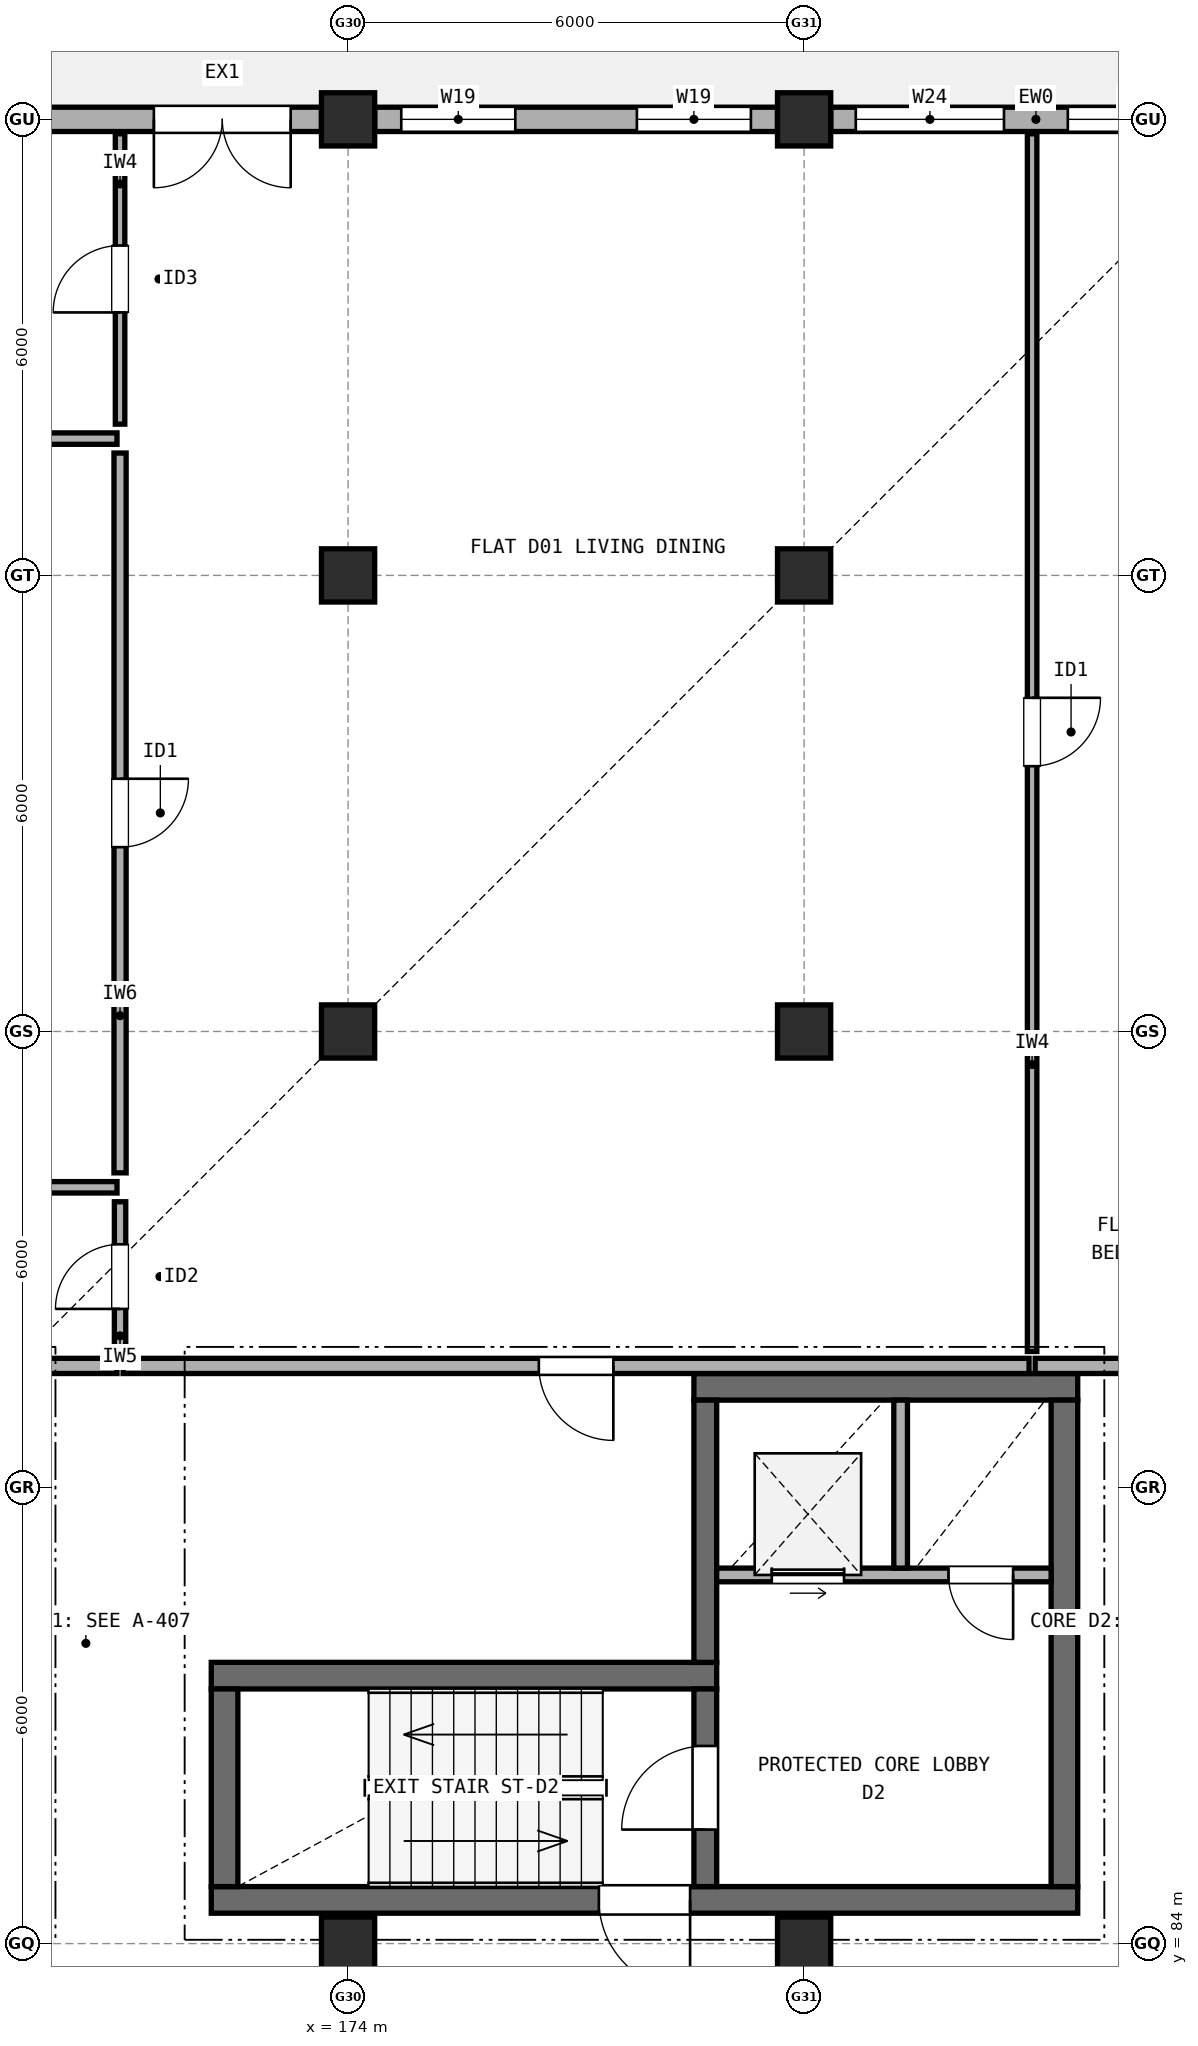
"""IFC4 building model, lengths in metres.
Left out: names, types, materials, properties, quantities, classifications, styles, units other than length and angle.
Written with IfcOpenShell. Run it as: python <this file> out.ifc"""

import sys

from ifc_helpers import new_model, si_unit, direction, frame, frame_2d, origin, origin_2d, place, context, subcontext, project, spatial, rectangle, extrude, element, fill, save


model = new_model("IFC4")
c1 = context("Model", 3, precision=1e-05, world=origin(), true_north=direction((0.0, 1.0)))
c2 = subcontext(c1, "Body", "Model", "MODEL_VIEW")
j1 = project(units=[si_unit("LENGTHUNIT", "METRE"), si_unit("PLANEANGLEUNIT", "RADIAN")], contexts=[c1])
p1 = place(None, origin())
s1 = spatial("IfcSite", under=j1, at=p1, CompositionType="ELEMENT")
p2 = place(p1, origin())
s2 = spatial("IfcBuilding", under=s1, at=p2, CompositionType="ELEMENT")
p3 = place(p2, origin())
s3 = spatial("IfcBuildingStorey", under=s2, at=p3, CompositionType="ELEMENT", Elevation=0.0)
for number, where, z_axis, x_axis in (
    (1, (174.0, 84.0, 0.0), (0.0, 0.0, 1.0), (1.0, 0.0, 0.0)),
    (2, (174.0, 96.0, 0.0), (0.0, 0.0, 1.0), (1.0, 0.0, 0.0)),
    (3, (174.0, 102.0, 0.0), (0.0, 0.0, 1.0), (1.0, 0.0, 0.0)),
    (4, (174.0, 108.0, 0.0), (0.0, 0.0, 1.0), (1.0, 0.0, 0.0)),
    (5, (180.0, 84.0, 0.0), (0.0, 0.0, 1.0), (1.0, 0.0, 0.0)),
    (6, (180.0, 96.0, 0.0), (0.0, 0.0, 1.0), (1.0, 0.0, 0.0)),
    (7, (180.0, 102.0, 0.0), (0.0, 0.0, 1.0), (1.0, 0.0, 0.0)),
    (8, (180.0, 108.0, 0.0), (0.0, 0.0, 1.0), (1.0, 0.0, 0.0)),
):
    element("IfcColumn", number, at=place(p3, frame(where, z_axis=z_axis, x_axis=x_axis)), inside=s3, PredefinedType="COLUMN", context=c2, shape_type="SweptSolid", body=[
        extrude(rectangle(XDim=0.7, YDim=0.7, at=origin_2d()), origin(), (0.0, 0.0, 1.0), 4.23),
    ])
p4 = place(p3, frame((185.7, 108.0, 0.0), z_axis=(0.0, 0.0, 1.0), x_axis=(-1.0, 0.0, 0.0)))
e9 = element("IfcWall", 9, at=p4, inside=s3, PredefinedType="STANDARD", context=c2, shape_type="SweptSolid", body=[
    extrude(rectangle(XDim=5.35, YDim=0.32, at=frame_2d((2.675, 0.0))), origin(), (0.0, 0.0, 1.0), 3.112),
])
p5 = place(p4, frame((0.43, 0.0, 0.9)))
e10 = element("IfcOpeningElement", 10, at=p5, cuts=e9, PredefinedType="OPENING", context=c2, shape_type="SweptSolid", body=[
    extrude(rectangle(XDim=1.8, YDim=1.6, at=frame_2d((0.9, 0.8))), frame((0.0, 0.17, 0.0), z_axis=(0.0, -1.0, 0.0), x_axis=(1.0, 0.0, 0.0)), (0.0, 0.0, 1.0), 0.34),
])
p6 = place(p4, frame((3.07, 0.0, 0.9)))
e11 = element("IfcOpeningElement", 11, at=p6, cuts=e9, PredefinedType="OPENING", context=c2, shape_type="SweptSolid", body=[
    extrude(rectangle(XDim=1.95, YDim=1.55, at=frame_2d((0.975, 0.775))), frame((0.0, 0.17, 0.0), z_axis=(0.0, -1.0, 0.0), x_axis=(1.0, 0.0, 0.0)), (0.0, 0.0, 1.0), 0.34),
])
p7 = place(p3, frame((179.65, 108.0, 0.0), z_axis=(0.0, 0.0, 1.0), x_axis=(-1.0, 0.0, 0.0)))
e12 = element("IfcWall", 12, at=p7, inside=s3, PredefinedType="STANDARD", context=c2, shape_type="SweptSolid", body=[
    extrude(rectangle(XDim=5.3, YDim=0.32, at=frame_2d((2.65, 0.0))), origin(), (0.0, 0.0, 1.0), 3.112),
])
p8 = place(p7, frame((0.35, 0.0, 0.9)))
e13 = element("IfcOpeningElement", 13, at=p8, cuts=e12, PredefinedType="OPENING", context=c2, shape_type="SweptSolid", body=[
    extrude(rectangle(XDim=1.5, YDim=1.5, at=frame_2d((0.75, 0.75))), frame((0.0, 0.17, 0.0), z_axis=(0.0, -1.0, 0.0), x_axis=(1.0, 0.0, 0.0)), (0.0, 0.0, 1.0), 0.34),
])
p9 = place(p7, frame((3.45, 0.0, 0.9)))
e14 = element("IfcOpeningElement", 14, at=p9, cuts=e12, PredefinedType="OPENING", context=c2, shape_type="SweptSolid", body=[
    extrude(rectangle(XDim=1.5, YDim=1.5, at=frame_2d((0.75, 0.75))), frame((0.0, 0.17, 0.0), z_axis=(0.0, -1.0, 0.0), x_axis=(1.0, 0.0, 0.0)), (0.0, 0.0, 1.0), 0.34),
])
p10 = place(p3, frame((173.65, 108.0, 0.0), z_axis=(0.0, 0.0, 1.0), x_axis=(-1.0, 0.0, 0.0)))
e15 = element("IfcWall", 15, at=p10, inside=s3, PredefinedType="STANDARD", context=c2, shape_type="SweptSolid", body=[
    extrude(rectangle(XDim=5.3, YDim=0.32, at=frame_2d((2.65, 0.0))), origin(), (0.0, 0.0, 1.0), 3.112),
])
p11 = place(p10, frame((0.405, 0.0, 0.0)))
e16 = element("IfcOpeningElement", 16, at=p11, cuts=e15, PredefinedType="OPENING", context=c2, shape_type="SweptSolid", body=[
    extrude(rectangle(XDim=1.8, YDim=2.2, at=frame_2d((0.9, 1.1))), frame((0.0, 0.17, 0.0), z_axis=(0.0, -1.0, 0.0), x_axis=(1.0, 0.0, 0.0)), (0.0, 0.0, 1.0), 0.34),
])
p12 = place(p3, frame((172.2, 84.575, 0.0), z_axis=(0.0, 0.0, 1.0), x_axis=(1.0, 0.0, 0.0)))
e17 = element("IfcWall", 17, at=p12, inside=s3, PredefinedType="SHEAR", context=c2, shape_type="SweptSolid", body=[
    extrude(rectangle(XDim=11.4, YDim=0.35, at=frame_2d((5.7, 0.0))), origin(), (0.0, 0.0, 1.0), 4.23),
])
p13 = place(p12, frame((5.1, 0.0, 0.0)))
e18 = element("IfcOpeningElement", 18, at=p13, cuts=e17, PredefinedType="OPENING", context=c2, shape_type="SweptSolid", body=[
    extrude(rectangle(XDim=1.2, YDim=2.15, at=frame_2d((0.6, 1.075))), frame((0.0, 0.185, 0.0), z_axis=(0.0, -1.0, 0.0), x_axis=(1.0, 0.0, 0.0)), (0.0, 0.0, 1.0), 0.37),
])
p14 = place(p3, frame((178.85, 87.525, 0.0), z_axis=(0.0, 0.0, 1.0), x_axis=(-1.0, 0.0, 0.0)))
e19 = element("IfcWall", 19, at=p14, inside=s3, PredefinedType="SHEAR", context=c2, shape_type="SweptSolid", body=[
    extrude(rectangle(XDim=6.65, YDim=0.35, at=frame_2d((3.325, 0.0))), origin(), (0.0, 0.0, 1.0), 4.23),
])
p15 = place(p3, frame((172.375, 87.35, 0.0), z_axis=(0.0, 0.0, 1.0), x_axis=(0.0, -1.0, 0.0)))
e20 = element("IfcWall", 20, at=p15, inside=s3, PredefinedType="SHEAR", context=c2, shape_type="SweptSolid", body=[
    extrude(rectangle(XDim=2.6, YDim=0.35, at=frame_2d((1.3, 0.0))), origin(), (0.0, 0.0, 1.0), 4.23),
])
p16 = place(p3, frame((178.7, 84.75, 0.0), z_axis=(0.0, 0.0, 1.0), x_axis=(0.0, 1.0, 0.0)))
e21 = element("IfcWall", 21, at=p16, inside=s3, PredefinedType="SHEAR", context=c2, shape_type="SweptSolid", body=[
    extrude(rectangle(XDim=2.6, YDim=0.3, at=frame_2d((1.3, 0.0))), origin(), (0.0, 0.0, 1.0), 4.23),
])
p17 = place(p16, frame((0.75, 0.0, 0.0)))
e22 = element("IfcOpeningElement", 22, at=p17, cuts=e21, PredefinedType="OPENING", context=c2, shape_type="SweptSolid", body=[
    extrude(rectangle(XDim=1.1, YDim=2.15, at=frame_2d((0.55, 1.075))), frame((0.0, 0.16, 0.0), z_axis=(0.0, -1.0, 0.0), x_axis=(1.0, 0.0, 0.0)), (0.0, 0.0, 1.0), 0.32),
])
p18 = place(p3, frame((183.6, 91.325, 0.0), z_axis=(0.0, 0.0, 1.0), x_axis=(-1.0, 0.0, 0.0)))
e23 = element("IfcWall", 23, at=p18, inside=s3, PredefinedType="SHEAR", context=c2, shape_type="SweptSolid", body=[
    extrude(rectangle(XDim=5.05, YDim=0.35, at=frame_2d((2.525, 0.0))), origin(), (0.0, 0.0, 1.0), 4.23),
])
p19 = place(p3, frame((183.425, 84.75, 0.0), z_axis=(0.0, 0.0, 1.0), x_axis=(0.0, 1.0, 0.0)))
e24 = element("IfcWall", 24, at=p19, inside=s3, PredefinedType="SHEAR", context=c2, shape_type="SweptSolid", body=[
    extrude(rectangle(XDim=6.4, YDim=0.35, at=frame_2d((3.2, 0.0))), origin(), (0.0, 0.0, 1.0), 4.23),
])
p20 = place(p3, frame((178.7, 87.7, 0.0), z_axis=(0.0, 0.0, 1.0), x_axis=(0.0, 1.0, 0.0)))
e25 = element("IfcWall", 25, at=p20, inside=s3, PredefinedType="SHEAR", context=c2, shape_type="SweptSolid", body=[
    extrude(rectangle(XDim=3.45, YDim=0.3, at=frame_2d((1.725, 0.0))), origin(), (0.0, 0.0, 1.0), 4.23),
])
p21 = place(p3, frame((178.85, 88.85, 0.0), z_axis=(0.0, 0.0, 1.0), x_axis=(1.0, 0.0, 0.0)))
e26 = element("IfcWall", 26, at=p21, inside=s3, PredefinedType="SOLIDWALL", context=c2, shape_type="SweptSolid", body=[
    extrude(rectangle(XDim=4.4, YDim=0.18, at=frame_2d((2.2, 0.0))), origin(), (0.0, 0.0, 1.0), 4.23),
])
p22 = place(p21, frame((0.725, 0.0, 0.0)))
e27 = element("IfcOpeningElement", 27, at=p22, cuts=e26, PredefinedType="OPENING", context=c2, shape_type="SweptSolid", body=[
    extrude(rectangle(XDim=0.95, YDim=2.15, at=frame_2d((0.475, 1.075))), frame((0.0, 0.1, 0.0), z_axis=(0.0, -1.0, 0.0), x_axis=(1.0, 0.0, 0.0)), (0.0, 0.0, 1.0), 0.2),
])
p23 = place(p21, frame((3.05, 0.0, 0.0)))
e28 = element("IfcOpeningElement", 28, at=p23, cuts=e26, PredefinedType="OPENING", context=c2, shape_type="SweptSolid", body=[
    extrude(rectangle(XDim=0.85, YDim=2.1, at=frame_2d((0.425, 1.05))), frame((0.0, 0.1, 0.0), z_axis=(0.0, -1.0, 0.0), x_axis=(1.0, 0.0, 0.0)), (0.0, 0.0, 1.0), 0.2),
])
p24 = place(p3, frame((181.27, 88.94, 0.0), z_axis=(0.0, 0.0, 1.0), x_axis=(0.0, 1.0, 0.0)))
e29 = element("IfcWall", 29, at=p24, inside=s3, PredefinedType="SOLIDWALL", context=c2, shape_type="SweptSolid", body=[
    extrude(rectangle(XDim=2.21, YDim=0.18, at=frame_2d((1.105, 0.0))), origin(), (0.0, 0.0, 1.0), 4.23),
])
p25 = place(p3, frame((166.09, 91.6, 0.0), z_axis=(0.0, 0.0, 1.0), x_axis=(1.0, 0.0, 0.0)))
e30 = element("IfcWall", 30, at=p25, inside=s3, PredefinedType="SOLIDWALL", context=c2, shape_type="SweptSolid", body=[
    extrude(rectangle(XDim=4.87, YDim=0.2, at=frame_2d((2.435, 0.0))), origin(), (0.0, 0.0, 1.0), 2.912),
])
p26 = place(p3, frame((171.04, 91.6, 0.0), z_axis=(0.0, 0.0, 1.0), x_axis=(1.0, 0.0, 0.0)))
e31 = element("IfcWall", 31, at=p26, inside=s3, PredefinedType="SOLIDWALL", context=c2, shape_type="SweptSolid", body=[
    extrude(rectangle(XDim=11.92, YDim=0.2, at=frame_2d((5.96, 0.0))), origin(), (0.0, 0.0, 1.0), 4.23),
])
p27 = place(p26, frame((5.47, 0.0, 0.0)))
e32 = element("IfcOpeningElement", 32, at=p27, cuts=e31, PredefinedType="OPENING", context=c2, shape_type="SweptSolid", body=[
    extrude(rectangle(XDim=0.98, YDim=2.15, at=frame_2d((0.49, 1.075))), frame((0.0, 0.11, 0.0), z_axis=(0.0, -1.0, 0.0), x_axis=(1.0, 0.0, 0.0)), (0.0, 0.0, 1.0), 0.22),
])
p28 = place(p3, frame((171.0, 103.99, 0.0), z_axis=(0.0, 0.0, 1.0), x_axis=(0.0, 1.0, 0.0)))
e33 = element("IfcWall", 33, at=p28, inside=s3, PredefinedType="PARTITIONING", context=c2, shape_type="SweptSolid", body=[
    extrude(rectangle(XDim=3.82, YDim=0.125, at=frame_2d((1.91, 0.0))), origin(), (0.0, 0.0, 1.0), 3.112),
])
p29 = place(p28, frame((1.47, 0.0, 0.0)))
e34 = element("IfcOpeningElement", 34, at=p29, cuts=e33, PredefinedType="OPENING", context=c2, shape_type="SweptSolid", body=[
    extrude(rectangle(XDim=0.88, YDim=2.1, at=frame_2d((0.44, 1.05))), frame((0.0, 0.073, 0.0), z_axis=(0.0, -1.0, 0.0), x_axis=(1.0, 0.0, 0.0)), (0.0, 0.0, 1.0), 0.145),
])
p30 = place(p3, frame((171.0, 94.14, 0.0), z_axis=(0.0, 0.0, 1.0), x_axis=(0.0, 1.0, 0.0)))
e35 = element("IfcWall", 35, at=p30, inside=s3, PredefinedType="PLUMBINGWALL", context=c2, shape_type="SweptSolid", body=[
    extrude(rectangle(XDim=9.47, YDim=0.16, at=frame_2d((4.735, 0.0))), origin(), (0.0, 0.0, 1.0), 3.562),
])
p31 = place(p30, frame((4.285, 0.0, 0.0)))
e36 = element("IfcOpeningElement", 36, at=p31, cuts=e35, PredefinedType="OPENING", context=c2, shape_type="SweptSolid", body=[
    extrude(rectangle(XDim=0.9, YDim=2.1, at=frame_2d((0.45, 1.05))), frame((0.0, 0.09, 0.0), z_axis=(0.0, -1.0, 0.0), x_axis=(1.0, 0.0, 0.0)), (0.0, 0.0, 1.0), 0.18),
])
p32 = place(p3, frame((171.0, 91.79, 0.0), z_axis=(0.0, 0.0, 1.0), x_axis=(0.0, 1.0, 0.0)))
e37 = element("IfcWall", 37, at=p32, inside=s3, PredefinedType="PARTITIONING", context=c2, shape_type="SweptSolid", body=[
    extrude(rectangle(XDim=1.97, YDim=0.15, at=frame_2d((0.985, 0.0))), origin(), (0.0, 0.0, 1.0), 4.23),
])
p33 = place(p32, frame((0.56, 0.0, 0.0)))
e38 = element("IfcOpeningElement", 38, at=p33, cuts=e37, PredefinedType="OPENING", context=c2, shape_type="SweptSolid", body=[
    extrude(rectangle(XDim=0.85, YDim=2.1, at=frame_2d((0.425, 1.05))), frame((0.0, 0.085, 0.0), z_axis=(0.0, -1.0, 0.0), x_axis=(1.0, 0.0, 0.0)), (0.0, 0.0, 1.0), 0.17),
])
p34 = place(p3, frame((166.09, 103.8, 0.0), z_axis=(0.0, 0.0, 1.0), x_axis=(1.0, 0.0, 0.0)))
e39 = element("IfcWall", 39, at=p34, inside=s3, PredefinedType="PARTITIONING", context=c2, shape_type="SweptSolid", body=[
    extrude(rectangle(XDim=4.87, YDim=0.15, at=frame_2d((2.435, 0.0))), origin(), (0.0, 0.0, 1.0), 3.612),
])
p35 = place(p3, frame((166.09, 93.95, 0.0), z_axis=(0.0, 0.0, 1.0), x_axis=(1.0, 0.0, 0.0)))
e40 = element("IfcWall", 40, at=p35, inside=s3, PredefinedType="PARTITIONING", context=c2, shape_type="SweptSolid", body=[
    extrude(rectangle(XDim=4.87, YDim=0.15, at=frame_2d((2.435, 0.0))), origin(), (0.0, 0.0, 1.0), 2.912),
])
p36 = place(p3, frame((183.04, 91.6, 0.0), z_axis=(0.0, 0.0, 1.0), x_axis=(1.0, 0.0, 0.0)))
e41 = element("IfcWall", 41, at=p36, inside=s3, PredefinedType="SOLIDWALL", context=c2, shape_type="SweptSolid", body=[
    extrude(rectangle(XDim=2.92, YDim=0.2, at=frame_2d((1.46, 0.0))), origin(), (0.0, 0.0, 1.0), 3.712),
])
p37 = place(p3, frame((183.0, 91.79, 0.0), z_axis=(0.0, 0.0, 1.0), x_axis=(0.0, 1.0, 0.0)))
e42 = element("IfcWall", 42, at=p37, inside=s3, PredefinedType="PARTITIONING", context=c2, shape_type="SweptSolid", body=[
    extrude(rectangle(XDim=16.02, YDim=0.125, at=frame_2d((8.01, 0.0))), origin(), (0.0, 0.0, 1.0), 3.112),
])
p38 = place(p37, frame((7.7, 0.0, 0.0)))
e43 = element("IfcOpeningElement", 43, at=p38, cuts=e42, PredefinedType="OPENING", context=c2, shape_type="SweptSolid", body=[
    extrude(rectangle(XDim=0.9, YDim=2.1, at=frame_2d((0.45, 1.05))), frame((0.0, 0.073, 0.0), z_axis=(0.0, -1.0, 0.0), x_axis=(1.0, 0.0, 0.0)), (0.0, 0.0, 1.0), 0.145),
])
p39 = place(p5, origin())
e44 = element("IfcWindow", 44, at=p39, inside=s3, PartitioningType="SINGLE_PANEL", PredefinedType="WINDOW", context=c2, shape_type="SweptSolid", body=[
    extrude(rectangle(XDim=1.8, YDim=1.6, at=frame_2d((0.9, 0.8))), frame((0.0, 0.03, 0.0), z_axis=(0.0, -1.0, 0.0), x_axis=(1.0, 0.0, 0.0)), (0.0, 0.0, 1.0), 0.06),
])
fill(e10, e44)
p40 = place(p6, origin())
e45 = element("IfcWindow", 45, at=p40, inside=s3, PartitioningType="SINGLE_PANEL", PredefinedType="WINDOW", context=c2, shape_type="SweptSolid", body=[
    extrude(rectangle(XDim=1.95, YDim=1.55, at=frame_2d((0.975, 0.775))), frame((0.0, 0.03, 0.0), z_axis=(0.0, -1.0, 0.0), x_axis=(1.0, 0.0, 0.0)), (0.0, 0.0, 1.0), 0.06),
])
fill(e11, e45)
p41 = place(p8, origin())
e46 = element("IfcWindow", 46, at=p41, inside=s3, PartitioningType="SINGLE_PANEL", PredefinedType="WINDOW", context=c2, shape_type="SweptSolid", body=[
    extrude(rectangle(XDim=1.5, YDim=1.5, at=frame_2d((0.75, 0.75))), frame((0.0, 0.03, 0.0), z_axis=(0.0, -1.0, 0.0), x_axis=(1.0, 0.0, 0.0)), (0.0, 0.0, 1.0), 0.06),
])
fill(e13, e46)
p42 = place(p9, origin())
e47 = element("IfcWindow", 47, at=p42, inside=s3, PartitioningType="SINGLE_PANEL", PredefinedType="WINDOW", context=c2, shape_type="SweptSolid", body=[
    extrude(rectangle(XDim=1.5, YDim=1.5, at=frame_2d((0.75, 0.75))), frame((0.0, 0.03, 0.0), z_axis=(0.0, -1.0, 0.0), x_axis=(1.0, 0.0, 0.0)), (0.0, 0.0, 1.0), 0.06),
])
fill(e14, e47)
p43 = place(p11, frame((1.8, 0.0, 0.0), z_axis=(0.0, 0.0, 1.0), x_axis=(-1.0, 0.0, 0.0)))
e48 = element("IfcDoor", 48, at=p43, inside=s3, OperationType="DOUBLE_DOOR_SINGLE_SWING", PredefinedType="DOOR", context=c2, shape_type="SweptSolid", body=[
    extrude(rectangle(XDim=1.8, YDim=2.2, at=frame_2d((0.9, 1.1))), frame((0.0, 0.025, 0.0), z_axis=(0.0, -1.0, 0.0), x_axis=(1.0, 0.0, 0.0)), (0.0, 0.0, 1.0), 0.05),
])
fill(e16, e48)
p44 = place(p13, origin())
e49 = element("IfcDoor", 49, at=p44, inside=s3, OperationType="SINGLE_SWING_RIGHT", PredefinedType="DOOR", context=c2, shape_type="SweptSolid", body=[
    extrude(rectangle(XDim=1.2, YDim=2.15, at=frame_2d((0.6, 1.075))), frame((0.0, 0.025, 0.0), z_axis=(0.0, -1.0, 0.0), x_axis=(1.0, 0.0, 0.0)), (0.0, 0.0, 1.0), 0.05),
])
fill(e18, e49)
p45 = place(p17, origin())
e50 = element("IfcDoor", 50, at=p45, inside=s3, OperationType="SINGLE_SWING_LEFT", PredefinedType="DOOR", context=c2, shape_type="SweptSolid", body=[
    extrude(rectangle(XDim=1.1, YDim=2.15, at=frame_2d((0.55, 1.075))), frame((0.0, 0.025, 0.0), z_axis=(0.0, -1.0, 0.0), x_axis=(1.0, 0.0, 0.0)), (0.0, 0.0, 1.0), 0.05),
])
fill(e22, e50)
p46 = place(p22, origin())
e51 = element("IfcDoor", 51, at=p46, inside=s3, OperationType="SLIDING_TO_LEFT", PredefinedType="DOOR", context=c2, shape_type="SweptSolid", body=[
    extrude(rectangle(XDim=0.95, YDim=2.15, at=frame_2d((0.475, 1.075))), frame((0.0, 0.025, 0.0), z_axis=(0.0, -1.0, 0.0), x_axis=(1.0, 0.0, 0.0)), (0.0, 0.0, 1.0), 0.05),
])
fill(e27, e51)
p47 = place(p23, frame((0.85, 0.0, 0.0), z_axis=(0.0, 0.0, 1.0), x_axis=(-1.0, 0.0, 0.0)))
e52 = element("IfcDoor", 52, at=p47, inside=s3, OperationType="SINGLE_SWING_RIGHT", PredefinedType="DOOR", context=c2, shape_type="SweptSolid", body=[
    extrude(rectangle(XDim=0.85, YDim=2.1, at=frame_2d((0.425, 1.05))), frame((0.0, 0.025, 0.0), z_axis=(0.0, -1.0, 0.0), x_axis=(1.0, 0.0, 0.0)), (0.0, 0.0, 1.0), 0.05),
])
fill(e28, e52)
p48 = place(p27, origin())
e53 = element("IfcDoor", 53, at=p48, inside=s3, OperationType="SINGLE_SWING_RIGHT", PredefinedType="DOOR", context=c2, shape_type="SweptSolid", body=[
    extrude(rectangle(XDim=0.98, YDim=2.15, at=frame_2d((0.49, 1.075))), frame((0.0, 0.025, 0.0), z_axis=(0.0, -1.0, 0.0), x_axis=(1.0, 0.0, 0.0)), (0.0, 0.0, 1.0), 0.05),
])
fill(e32, e53)
p49 = place(p29, origin())
e54 = element("IfcDoor", 54, at=p49, inside=s3, OperationType="SINGLE_SWING_LEFT", PredefinedType="DOOR", context=c2, shape_type="SweptSolid", body=[
    extrude(rectangle(XDim=0.88, YDim=2.1, at=frame_2d((0.44, 1.05))), frame((0.0, 0.025, 0.0), z_axis=(0.0, -1.0, 0.0), x_axis=(1.0, 0.0, 0.0)), (0.0, 0.0, 1.0), 0.05),
])
fill(e34, e54)
p50 = place(p31, origin())
e55 = element("IfcDoor", 55, at=p50, inside=s3, OperationType="SINGLE_SWING_RIGHT", PredefinedType="DOOR", context=c2, shape_type="SweptSolid", body=[
    extrude(rectangle(XDim=0.9, YDim=2.1, at=frame_2d((0.45, 1.05))), frame((0.0, 0.025, 0.0), z_axis=(0.0, -1.0, 0.0), x_axis=(1.0, 0.0, 0.0)), (0.0, 0.0, 1.0), 0.05),
])
fill(e36, e55)
p51 = place(p33, origin())
e56 = element("IfcDoor", 56, at=p51, inside=s3, OperationType="SINGLE_SWING_LEFT", PredefinedType="DOOR", context=c2, shape_type="SweptSolid", body=[
    extrude(rectangle(XDim=0.85, YDim=2.1, at=frame_2d((0.425, 1.05))), frame((0.0, 0.025, 0.0), z_axis=(0.0, -1.0, 0.0), x_axis=(1.0, 0.0, 0.0)), (0.0, 0.0, 1.0), 0.05),
])
fill(e38, e56)
p52 = place(p38, origin())
e57 = element("IfcDoor", 57, at=p52, inside=s3, OperationType="SINGLE_SWING_RIGHT", PredefinedType="DOOR", context=c2, shape_type="SweptSolid", body=[
    extrude(rectangle(XDim=0.9, YDim=2.1, at=frame_2d((0.45, 1.05))), frame((0.0, 0.025, 0.0), z_axis=(0.0, -1.0, 0.0), x_axis=(1.0, 0.0, 0.0)), (0.0, 0.0, 1.0), 0.05),
])
fill(e43, e57)
save(model, sys.argv[1])
